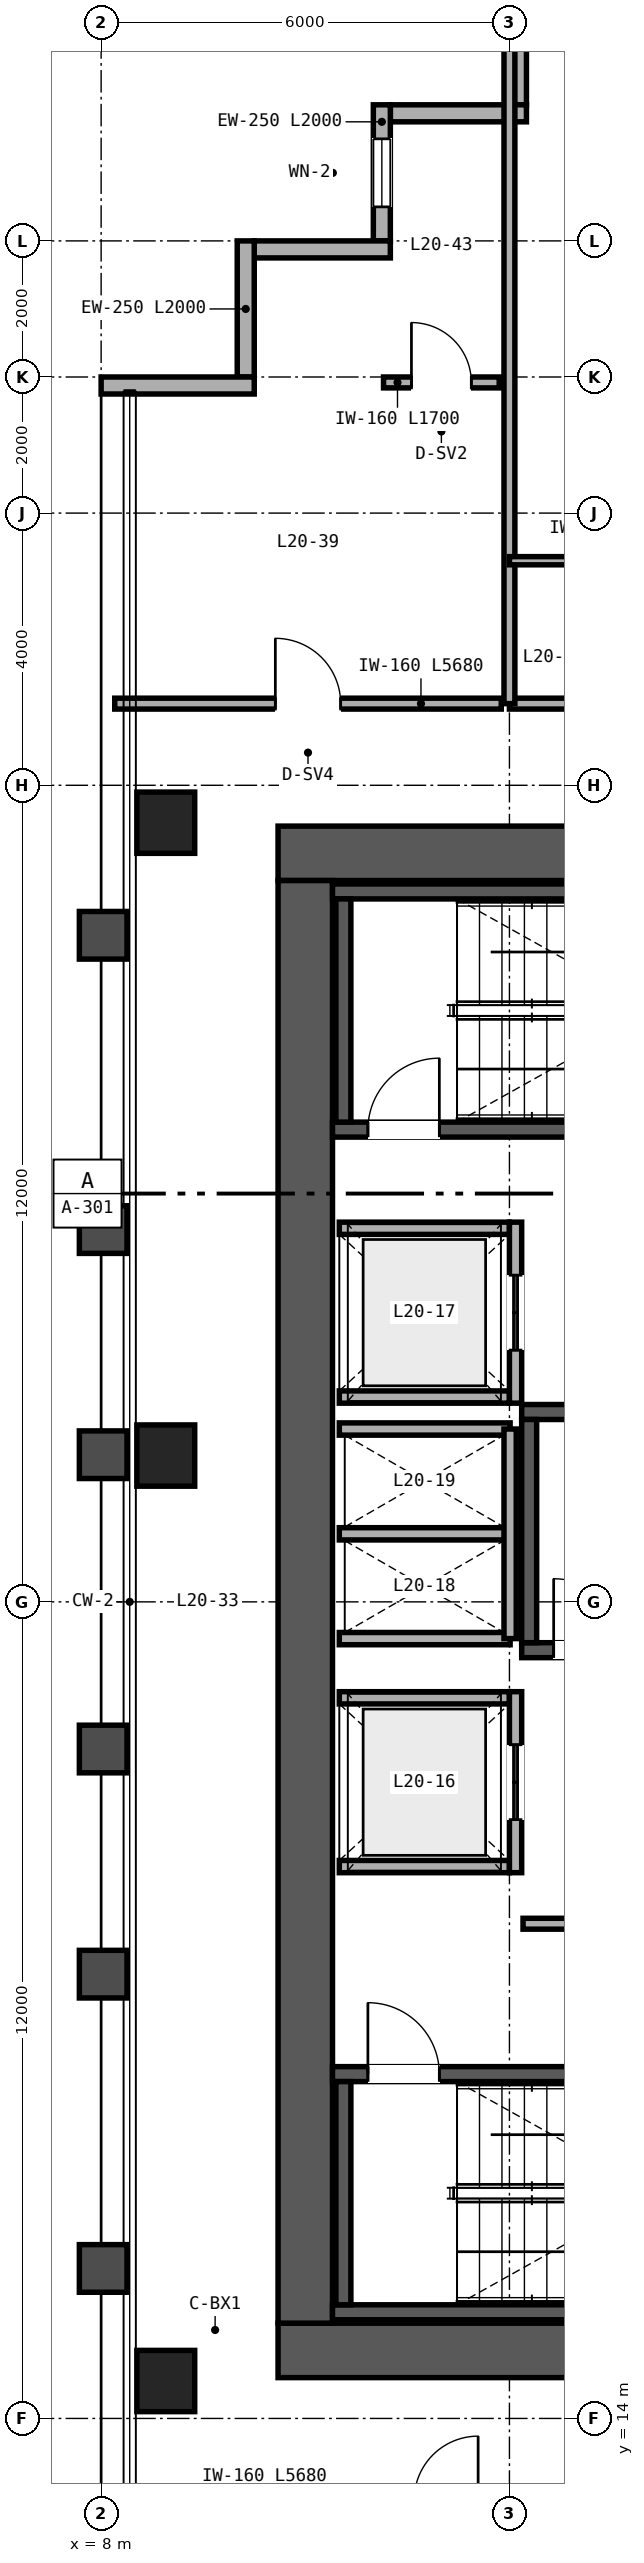
"""IFC4 building model, lengths in metres.
Left out: names, types, materials, properties, quantities, classifications, styles, units other than length and angle.
Written with IfcOpenShell. Run it as: python <this file> out.ifc"""

import sys

from ifc_helpers import new_model, si_unit, direction, frame, frame_2d, origin, origin_2d, place, context, subcontext, project, spatial, rectangle, hollow_rectangle, extrude, source, transform, mapped, element, fill, save


model = new_model("IFC4")
c1 = context("Model", 3, precision=1e-05, world=origin(), true_north=direction((0.0, 1.0)))
c2 = subcontext(c1, "Body", "Model", "MODEL_VIEW")
j1 = project(units=[si_unit("LENGTHUNIT", "METRE"), si_unit("PLANEANGLEUNIT", "RADIAN")], contexts=[c1])
p1 = place(None, origin())
s1 = spatial("IfcSite", under=j1, at=p1, CompositionType="ELEMENT")
p2 = place(p1, origin())
s2 = spatial("IfcBuilding", under=s1, at=p2, CompositionType="ELEMENT")
p3 = place(p2, frame((0.0, 0.0, 81.6)))
s3 = spatial("IfcBuildingStorey", under=s2, at=p3, CompositionType="ELEMENT", Elevation=81.6)
p4 = place(p3, frame((10.6, 15.0, 0.0), z_axis=(0.0, 0.0, 1.0), x_axis=(1.0, 0.0, 0.0)))
e1 = element("IfcWall", 1, at=p4, inside=s3, PredefinedType="SHEAR", context=c2, shape_type="SweptSolid", body=[
    extrude(rectangle(XDim=12.8, YDim=0.8, at=frame_2d((6.4, 0.0))), origin(), (0.0, 0.0, 1.0), 3.28),
])
p5 = place(p4, frame((10.3, 0.0, 0.0)))
e2 = element("IfcOpeningElement", 2, at=p5, cuts=e1, PredefinedType="OPENING", context=c2, shape_type="SweptSolid", body=[
    extrude(rectangle(XDim=1.0, YDim=2.15, at=frame_2d((0.5, 1.075))), frame((0.0, 0.41, 0.0), z_axis=(0.0, -1.0, 0.0), x_axis=(1.0, 0.0, 0.0)), (0.0, 0.0, 1.0), 0.82),
])
p6 = place(p3, frame((10.6, 37.0, 0.0), z_axis=(0.0, 0.0, 1.0), x_axis=(1.0, 0.0, 0.0)))
e3 = element("IfcWall", 3, at=p6, inside=s3, PredefinedType="SHEAR", context=c2, shape_type="SweptSolid", body=[
    extrude(rectangle(XDim=12.8, YDim=0.8, at=frame_2d((6.4, 0.0))), origin(), (0.0, 0.0, 1.0), 3.28),
])
p7 = place(p6, frame((8.98, 0.0, 0.0)))
e4 = element("IfcOpeningElement", 4, at=p7, cuts=e3, PredefinedType="OPENING", context=c2, shape_type="SweptSolid", body=[
    extrude(rectangle(XDim=1.0, YDim=2.15, at=frame_2d((0.5, 1.075))), frame((0.0, 0.41, 0.0), z_axis=(0.0, -1.0, 0.0), x_axis=(1.0, 0.0, 0.0)), (0.0, 0.0, 1.0), 0.82),
])
p8 = place(p3, frame((11.0, 15.4, 0.0), z_axis=(0.0, 0.0, 1.0), x_axis=(0.0, 1.0, 0.0)))
e5 = element("IfcWall", 5, at=p8, inside=s3, PredefinedType="SHEAR", context=c2, shape_type="SweptSolid", body=[
    extrude(rectangle(XDim=21.2, YDim=0.8, at=frame_2d((10.6, 0.0))), origin(), (0.0, 0.0, 1.0), 3.28),
])
p9 = place(p3, frame((11.4, 15.56, 0.0), z_axis=(0.0, 0.0, 1.0), x_axis=(1.0, 0.0, 0.0)))
e6 = element("IfcWall", 6, at=p9, inside=s3, PredefinedType="SHEAR", context=c2, shape_type="SweptSolid", body=[
    extrude(rectangle(XDim=7.91, YDim=0.22, at=frame_2d((3.955, 0.0))), origin(), (0.0, 0.0, 1.0), 3.4),
])
p10 = place(p3, frame((11.4, 19.06, 0.0), z_axis=(0.0, 0.0, 1.0), x_axis=(1.0, 0.0, 0.0)))
e7 = element("IfcWall", 7, at=p10, inside=s3, PredefinedType="SHEAR", context=c2, shape_type="SweptSolid", body=[
    extrude(rectangle(XDim=7.91, YDim=0.22, at=frame_2d((3.955, 0.0))), origin(), (0.0, 0.0, 1.0), 3.4),
])
p11 = place(p10, frame((0.52, 0.0, 0.0)))
e8 = element("IfcOpeningElement", 8, at=p11, cuts=e7, PredefinedType="OPENING", context=c2, shape_type="SweptSolid", body=[
    extrude(rectangle(XDim=1.05, YDim=2.15, at=frame_2d((0.525, 1.075))), frame((0.0, 0.12, 0.0), z_axis=(0.0, -1.0, 0.0), x_axis=(1.0, 0.0, 0.0)), (0.0, 0.0, 1.0), 0.24),
])
p12 = place(p3, frame((11.56, 15.67, 0.0), z_axis=(0.0, 0.0, 1.0), x_axis=(0.0, 1.0, 0.0)))
e9 = element("IfcWall", 9, at=p12, inside=s3, PredefinedType="SHEAR", context=c2, shape_type="SweptSolid", body=[
    extrude(rectangle(XDim=3.28, YDim=0.22, at=frame_2d((1.64, 0.0))), origin(), (0.0, 0.0, 1.0), 3.4),
])
p13 = place(p3, frame((11.4, 32.94, 0.0), z_axis=(0.0, 0.0, 1.0), x_axis=(1.0, 0.0, 0.0)))
e10 = element("IfcWall", 10, at=p13, inside=s3, PredefinedType="SHEAR", context=c2, shape_type="SweptSolid", body=[
    extrude(rectangle(XDim=7.91, YDim=0.22, at=frame_2d((3.955, 0.0))), origin(), (0.0, 0.0, 1.0), 3.4),
])
p14 = place(p13, frame((0.52, 0.0, 0.0)))
e11 = element("IfcOpeningElement", 11, at=p14, cuts=e10, PredefinedType="OPENING", context=c2, shape_type="SweptSolid", body=[
    extrude(rectangle(XDim=1.05, YDim=2.15, at=frame_2d((0.525, 1.075))), frame((0.0, 0.12, 0.0), z_axis=(0.0, -1.0, 0.0), x_axis=(1.0, 0.0, 0.0)), (0.0, 0.0, 1.0), 0.24),
])
p15 = place(p3, frame((11.4, 36.44, 0.0), z_axis=(0.0, 0.0, 1.0), x_axis=(1.0, 0.0, 0.0)))
e12 = element("IfcWall", 12, at=p15, inside=s3, PredefinedType="SHEAR", context=c2, shape_type="SweptSolid", body=[
    extrude(rectangle(XDim=7.91, YDim=0.22, at=frame_2d((3.955, 0.0))), origin(), (0.0, 0.0, 1.0), 3.4),
])
p16 = place(p3, frame((11.56, 33.05, 0.0), z_axis=(0.0, 0.0, 1.0), x_axis=(0.0, 1.0, 0.0)))
e13 = element("IfcWall", 13, at=p16, inside=s3, PredefinedType="SHEAR", context=c2, shape_type="SweptSolid", body=[
    extrude(rectangle(XDim=3.28, YDim=0.22, at=frame_2d((1.64, 0.0))), origin(), (0.0, 0.0, 1.0), 3.4),
])
p17 = place(p3, frame((14.18, 25.29, 0.0), z_axis=(0.0, 0.0, 1.0), x_axis=(1.0, 0.0, 0.0)))
e14 = element("IfcWall", 14, at=p17, inside=s3, PredefinedType="SHEAR", context=c2, shape_type="SweptSolid", body=[
    extrude(rectangle(XDim=8.42, YDim=0.22, at=frame_2d((4.21, 0.0))), origin(), (0.0, 0.0, 1.0), 3.4),
])
p18 = place(p17, frame((0.47, 0.0, 0.0)))
e15 = element("IfcOpeningElement", 15, at=p18, cuts=e14, PredefinedType="OPENING", context=c2, shape_type="SweptSolid", body=[
    extrude(rectangle(XDim=1.05, YDim=2.15, at=frame_2d((0.525, 1.075))), frame((0.0, 0.12, 0.0), z_axis=(0.0, -1.0, 0.0), x_axis=(1.0, 0.0, 0.0)), (0.0, 0.0, 1.0), 0.24),
])
p19 = place(p3, frame((14.18, 28.79, 0.0), z_axis=(0.0, 0.0, 1.0), x_axis=(1.0, 0.0, 0.0)))
e16 = element("IfcWall", 16, at=p19, inside=s3, PredefinedType="SHEAR", context=c2, shape_type="SweptSolid", body=[
    extrude(rectangle(XDim=8.42, YDim=0.22, at=frame_2d((4.21, 0.0))), origin(), (0.0, 0.0, 1.0), 3.4),
])
p20 = place(p3, frame((14.29, 25.4, 0.0), z_axis=(0.0, 0.0, 1.0), x_axis=(0.0, 1.0, 0.0)))
e17 = element("IfcWall", 17, at=p20, inside=s3, PredefinedType="SHEAR", context=c2, shape_type="SweptSolid", body=[
    extrude(rectangle(XDim=3.28, YDim=0.22, at=frame_2d((1.64, 0.0))), origin(), (0.0, 0.0, 1.0), 3.4),
])
m1 = source(origin(), c2, "Body", "SweptSolid", [
    extrude(hollow_rectangle(XDim=0.85, YDim=0.9, WallThickness=0.04, at=origin_2d()), origin(), (0.0, 0.0, 1.0), 3.28),
])
for number, where, z_axis, x_axis in (
    (18, (8.95, 14.55, 0.0), (0.0, 0.0, 1.0), (1.0, 0.0, 0.0)),
    (19, (8.95, 28.15, 0.0), (0.0, 0.0, 1.0), (1.0, 0.0, 0.0)),
    (20, (8.95, 37.45, 0.0), (0.0, 0.0, 1.0), (1.0, 0.0, 0.0)),
):
    element("IfcColumn", number, at=place(p3, frame(where, z_axis=z_axis, x_axis=x_axis)), inside=s3, PredefinedType="COLUMN", context=c2, shape_type="MappedRepresentation", body=[
        mapped(m1, transform((0.0, 0.0, 0.0), scale=1.0)),
    ])
p21 = place(p3, frame((14.125, 50.0, 0.0), z_axis=(0.0, 0.0, 1.0), x_axis=(0.0, -1.0, 0.0)))
e21 = element("IfcWall", 21, at=p21, inside=s3, PredefinedType="SOLIDWALL", context=c2, shape_type="SweptSolid", body=[
    extrude(rectangle(XDim=2.0, YDim=0.25, at=frame_2d((1.0, 0.0))), origin(), (0.0, 0.0, 1.0), 2.587),
])
p22 = place(p3, frame((14.25, 47.875, 0.0), z_axis=(0.0, 0.0, 1.0), x_axis=(-1.0, 0.0, 0.0)))
e22 = element("IfcWall", 22, at=p22, inside=s3, PredefinedType="SOLIDWALL", context=c2, shape_type="SweptSolid", body=[
    extrude(rectangle(XDim=2.0, YDim=0.25, at=frame_2d((1.0, 0.0))), origin(), (0.0, 0.0, 1.0), 3.28),
])
p23 = place(p3, frame((12.125, 48.0, 0.0), z_axis=(0.0, 0.0, 1.0), x_axis=(0.0, -1.0, 0.0)))
e23 = element("IfcWall", 23, at=p23, inside=s3, PredefinedType="SOLIDWALL", context=c2, shape_type="SweptSolid", body=[
    extrude(rectangle(XDim=2.0, YDim=0.25, at=frame_2d((1.0, 0.0))), origin(), (0.0, 0.0, 1.0), 3.28),
])
p24 = place(p23, frame((0.5, 0.0, 0.85)))
e24 = element("IfcOpeningElement", 24, at=p24, cuts=e23, PredefinedType="OPENING", context=c2, shape_type="SweptSolid", body=[
    extrude(rectangle(XDim=1.0, YDim=1.9, at=frame_2d((0.5, 0.95))), frame((0.0, 0.135, 0.0), z_axis=(0.0, -1.0, 0.0), x_axis=(1.0, 0.0, 0.0)), (0.0, 0.0, 1.0), 0.27),
])
for number, where, z_axis, x_axis in (
    (25, (12.25, 45.875, 0.0), (0.0, 0.0, 1.0), (-1.0, 0.0, 0.0)),
    (26, (10.125, 46.0, 0.0), (0.0, 0.0, 1.0), (0.0, -1.0, 0.0)),
):
    element("IfcWall", number, at=place(p3, frame(where, z_axis=z_axis, x_axis=x_axis)), inside=s3, PredefinedType="SOLIDWALL", context=c2, shape_type="SweptSolid", body=[
        extrude(rectangle(XDim=2.0, YDim=0.25, at=frame_2d((1.0, 0.0))), origin(), (0.0, 0.0, 1.0), 3.28),
    ])
p25 = place(p3, frame((10.25, 43.875, 0.0), z_axis=(0.0, 0.0, 1.0), x_axis=(-1.0, 0.0, 0.0)))
e27 = element("IfcWall", 27, at=p25, inside=s3, PredefinedType="SOLIDWALL", context=c2, shape_type="SweptSolid", body=[
    extrude(rectangle(XDim=2.25, YDim=0.25, at=frame_2d((1.125, 0.0))), origin(), (0.0, 0.0, 1.0), 3.28),
])
for number, where, z_axis, x_axis in (
    (28, (11.5, 22.11, 0.0), (0.0, 0.0, 1.0), (1.0, 0.0, 0.0)),
    (29, (11.5, 24.59, 0.0), (0.0, 0.0, 1.0), (1.0, 0.0, 0.0)),
):
    element("IfcWall", number, at=place(p3, frame(where, z_axis=z_axis, x_axis=x_axis)), inside=s3, PredefinedType="SOLIDWALL", context=c2, shape_type="SweptSolid", body=[
        extrude(rectangle(XDim=2.5, YDim=0.18, at=frame_2d((1.25, 0.0))), origin(), (0.0, 0.0, 1.0), 3.28),
    ])
p26 = place(p3, frame((14.09, 22.02, 0.0), z_axis=(0.0, 0.0, 1.0), x_axis=(0.0, 1.0, 0.0)))
e30 = element("IfcWall", 30, at=p26, inside=s3, PredefinedType="SOLIDWALL", context=c2, shape_type="SweptSolid", body=[
    extrude(rectangle(XDim=2.66, YDim=0.18, at=frame_2d((1.33, 0.0))), origin(), (0.0, 0.0, 1.0), 3.28),
])
p27 = place(p26, frame((0.78, 0.0, 0.0)))
e31 = element("IfcOpeningElement", 31, at=p27, cuts=e30, PredefinedType="OPENING", context=c2, shape_type="SweptSolid", body=[
    extrude(rectangle(XDim=1.1, YDim=2.2, at=frame_2d((0.55, 1.1))), frame((0.0, 0.1, 0.0), z_axis=(0.0, -1.0, 0.0), x_axis=(1.0, 0.0, 0.0)), (0.0, 0.0, 1.0), 0.2),
])
for number, where, z_axis, x_axis in (
    (32, (11.5, 29.01, 0.0), (0.0, 0.0, 1.0), (1.0, 0.0, 0.0)),
    (33, (11.5, 31.49, 0.0), (0.0, 0.0, 1.0), (1.0, 0.0, 0.0)),
):
    element("IfcWall", number, at=place(p3, frame(where, z_axis=z_axis, x_axis=x_axis)), inside=s3, PredefinedType="SOLIDWALL", context=c2, shape_type="SweptSolid", body=[
        extrude(rectangle(XDim=2.5, YDim=0.18, at=frame_2d((1.25, 0.0))), origin(), (0.0, 0.0, 1.0), 3.28),
    ])
p28 = place(p3, frame((14.09, 28.92, 0.0), z_axis=(0.0, 0.0, 1.0), x_axis=(0.0, 1.0, 0.0)))
e34 = element("IfcWall", 34, at=p28, inside=s3, PredefinedType="SOLIDWALL", context=c2, shape_type="SweptSolid", body=[
    extrude(rectangle(XDim=2.66, YDim=0.18, at=frame_2d((1.33, 0.0))), origin(), (0.0, 0.0, 1.0), 3.28),
])
p29 = place(p28, frame((0.78, 0.0, 0.0)))
e35 = element("IfcOpeningElement", 35, at=p29, cuts=e34, PredefinedType="OPENING", context=c2, shape_type="SweptSolid", body=[
    extrude(rectangle(XDim=1.1, YDim=2.2, at=frame_2d((0.55, 1.1))), frame((0.0, 0.1, 0.0), z_axis=(0.0, -1.0, 0.0), x_axis=(1.0, 0.0, 0.0)), (0.0, 0.0, 1.0), 0.2),
])
for number, where, z_axis, x_axis in (
    (36, (11.5, 25.46, 0.0), (0.0, 0.0, 1.0), (1.0, 0.0, 0.0)),
    (37, (11.5, 27.0, 0.0), (0.0, 0.0, 1.0), (1.0, 0.0, 0.0)),
    (38, (11.5, 28.54, 0.0), (0.0, 0.0, 1.0), (1.0, 0.0, 0.0)),
):
    element("IfcWall", number, at=place(p3, frame(where, z_axis=z_axis, x_axis=x_axis)), inside=s3, PredefinedType="SOLIDWALL", context=c2, shape_type="SweptSolid", body=[
        extrude(rectangle(XDim=2.51, YDim=0.18, at=frame_2d((1.255, 0.0))), origin(), (0.0, 0.0, 1.0), 3.28),
    ])
p30 = place(p3, frame((14.01, 25.46, 0.0), z_axis=(0.0, 0.0, 1.0), x_axis=(0.0, 1.0, 0.0)))
e39 = element("IfcWall", 39, at=p30, inside=s3, PredefinedType="SOLIDWALL", context=c2, shape_type="SweptSolid", body=[
    extrude(rectangle(XDim=3.08, YDim=0.18, at=frame_2d((1.54, 0.0))), origin(), (0.0, 0.0, 1.0), 3.28),
])
p31 = place(p3, frame((14.2, 21.27, 0.0), z_axis=(0.0, 0.0, 1.0), x_axis=(1.0, 0.0, 0.0)))
e40 = element("IfcWall", 40, at=p31, inside=s3, PredefinedType="PARTITIONING", context=c2, shape_type="SweptSolid", body=[
    extrude(rectangle(XDim=4.58, YDim=0.16, at=frame_2d((2.29, 0.0))), origin(), (0.0, 0.0, 1.0), 3.28),
])
p32 = place(p31, frame((1.8, 0.0, 0.0)))
e41 = element("IfcOpeningElement", 41, at=p32, cuts=e40, PredefinedType="OPENING", context=c2, shape_type="SweptSolid", body=[
    extrude(rectangle(XDim=1.0, YDim=2.15, at=frame_2d((0.5, 1.075))), frame((0.0, 0.09, 0.0), z_axis=(0.0, -1.0, 0.0), x_axis=(1.0, 0.0, 0.0)), (0.0, 0.0, 1.0), 0.18),
])
p33 = place(p3, frame((8.2, 39.2, 0.0), z_axis=(0.0, 0.0, 1.0), x_axis=(1.0, 0.0, 0.0)))
e42 = element("IfcWall", 42, at=p33, inside=s3, PredefinedType="PARTITIONING", context=c2, shape_type="SweptSolid", body=[
    extrude(rectangle(XDim=5.68, YDim=0.16, at=frame_2d((2.84, 0.0))), origin(), (0.0, 0.0, 1.0), 3.28),
])
p34 = place(p33, frame((2.36, 0.0, 0.0)))
e43 = element("IfcOpeningElement", 43, at=p34, cuts=e42, PredefinedType="OPENING", context=c2, shape_type="SweptSolid", body=[
    extrude(rectangle(XDim=0.96, YDim=2.15, at=frame_2d((0.48, 1.075))), frame((0.0, 0.09, 0.0), z_axis=(0.0, -1.0, 0.0), x_axis=(1.0, 0.0, 0.0)), (0.0, 0.0, 1.0), 0.18),
])
p35 = place(p3, frame((12.15, 43.92, 0.0), z_axis=(0.0, 0.0, 1.0), x_axis=(1.0, 0.0, 0.0)))
e44 = element("IfcWall", 44, at=p35, inside=s3, PredefinedType="PARTITIONING", context=c2, shape_type="SweptSolid", body=[
    extrude(rectangle(XDim=1.7, YDim=0.16, at=frame_2d((0.85, 0.0))), origin(), (0.0, 0.0, 1.0), 3.28),
])
p36 = place(p35, frame((0.41, 0.0, 0.0)))
e45 = element("IfcOpeningElement", 45, at=p36, cuts=e44, PredefinedType="OPENING", context=c2, shape_type="SweptSolid", body=[
    extrude(rectangle(XDim=0.88, YDim=2.15, at=frame_2d((0.44, 1.075))), frame((0.0, 0.09, 0.0), z_axis=(0.0, -1.0, 0.0), x_axis=(1.0, 0.0, 0.0)), (0.0, 0.0, 1.0), 0.18),
])
p37 = place(p3, frame((14.0, 39.2, 0.0), z_axis=(0.0, 0.0, 1.0), x_axis=(1.0, 0.0, 0.0)))
e46 = element("IfcWall", 46, at=p37, inside=s3, PredefinedType="PARTITIONING", context=c2, shape_type="SweptSolid", body=[
    extrude(rectangle(XDim=36.0, YDim=0.16, at=frame_2d((18.0, 0.0))), origin(), (0.0, 0.0, 1.0), 2.501),
])
p38 = place(p37, frame((7.7, 0.0, 0.0)))
e47 = element("IfcOpeningElement", 47, at=p38, cuts=e46, PredefinedType="OPENING", context=c2, shape_type="SweptSolid", body=[
    extrude(rectangle(XDim=0.98, YDim=2.2, at=frame_2d((0.49, 1.1))), frame((0.0, 0.09, 0.0), z_axis=(0.0, -1.0, 0.0), x_axis=(1.0, 0.0, 0.0)), (0.0, 0.0, 1.0), 0.18),
])
p39 = place(p37, frame((13.02, 0.0, 0.0)))
e48 = element("IfcOpeningElement", 48, at=p39, cuts=e46, PredefinedType="OPENING", context=c2, shape_type="SweptSolid", body=[
    extrude(rectangle(XDim=0.96, YDim=2.15, at=frame_2d((0.48, 1.075))), frame((0.0, 0.09, 0.0), z_axis=(0.0, -1.0, 0.0), x_axis=(1.0, 0.0, 0.0)), (0.0, 0.0, 1.0), 0.18),
])
p40 = place(p37, frame((24.72, 0.0, 0.0)))
e49 = element("IfcOpeningElement", 49, at=p40, cuts=e46, PredefinedType="OPENING", context=c2, shape_type="SweptSolid", body=[
    extrude(rectangle(XDim=0.98, YDim=2.2, at=frame_2d((0.49, 1.1))), frame((0.0, 0.09, 0.0), z_axis=(0.0, -1.0, 0.0), x_axis=(1.0, 0.0, 0.0)), (0.0, 0.0, 1.0), 0.18),
])
p41 = place(p37, frame((30.14, 0.0, 0.0)))
e50 = element("IfcOpeningElement", 50, at=p41, cuts=e46, PredefinedType="OPENING", context=c2, shape_type="SweptSolid", body=[
    extrude(rectangle(XDim=0.94, YDim=2.15, at=frame_2d((0.47, 1.075))), frame((0.0, 0.09, 0.0), z_axis=(0.0, -1.0, 0.0), x_axis=(1.0, 0.0, 0.0)), (0.0, 0.0, 1.0), 0.18),
])
p42 = place(p37, frame((34.74, 0.0, 0.0)))
e51 = element("IfcOpeningElement", 51, at=p42, cuts=e46, PredefinedType="OPENING", context=c2, shape_type="SweptSolid", body=[
    extrude(rectangle(XDim=0.94, YDim=2.15, at=frame_2d((0.47, 1.075))), frame((0.0, 0.09, 0.0), z_axis=(0.0, -1.0, 0.0), x_axis=(1.0, 0.0, 0.0)), (0.0, 0.0, 1.0), 0.18),
])
p43 = place(p3, frame((14.0, 39.2, 0.0), z_axis=(0.0, 0.0, 1.0), x_axis=(0.0, 1.0, 0.0)))
e52 = element("IfcWall", 52, at=p43, inside=s3, PredefinedType="PARTITIONING", context=c2, shape_type="SweptSolid", body=[
    extrude(rectangle(XDim=10.44, YDim=0.16, at=frame_2d((5.22, 0.0))), origin(), (0.0, 0.0, 1.0), 2.587),
])
p44 = place(p3, frame((14.0, 41.3, 0.0), z_axis=(0.0, 0.0, 1.0), x_axis=(1.0, 0.0, 0.0)))
e53 = element("IfcWall", 53, at=p44, inside=s3, PredefinedType="PARTITIONING", context=c2, shape_type="SweptSolid", body=[
    extrude(rectangle(XDim=2.05, YDim=0.12, at=frame_2d((1.025, 0.0))), origin(), (0.0, 0.0, 1.0), 3.28),
])
m2 = source(origin(), c2, "Body", "SweptSolid", [
    extrude(rectangle(XDim=1.0, YDim=1.9, at=frame_2d((0.5, 0.95))), frame((0.0, 0.03, 0.0), z_axis=(0.0, -1.0, 0.0), x_axis=(1.0, 0.0, 0.0)), (0.0, 0.0, 1.0), 0.06),
])
p45 = place(p24, origin())
e54 = element("IfcWindow", 54, at=p45, inside=s3, PartitioningType="SINGLE_PANEL", PredefinedType="WINDOW", context=c2, shape_type="MappedRepresentation", body=[
    mapped(m2, transform((0.0, 0.0, 0.0), scale=1.0)),
])
fill(e24, e54)
m3 = source(origin(), c2, "Body", "SweptSolid", [
    extrude(rectangle(XDim=1.05, YDim=2.15, at=frame_2d((0.525, 1.075))), frame((0.0, 0.025, 0.0), z_axis=(0.0, -1.0, 0.0), x_axis=(1.0, 0.0, 0.0)), (0.0, 0.0, 1.0), 0.05),
])
p46 = place(p11, origin())
e55 = element("IfcDoor", 55, at=p46, inside=s3, OperationType="SINGLE_SWING_LEFT", PredefinedType="DOOR", context=c2, shape_type="MappedRepresentation", body=[
    mapped(m3, transform((0.0, 0.0, 0.0), scale=1.0)),
])
fill(e8, e55)
p47 = place(p14, origin())
e56 = element("IfcDoor", 56, at=p47, inside=s3, OperationType="SINGLE_SWING_RIGHT", PredefinedType="DOOR", context=c2, shape_type="MappedRepresentation", body=[
    mapped(m3, transform((0.0, 0.0, 0.0), scale=1.0)),
])
fill(e11, e56)
p48 = place(p18, origin())
e57 = element("IfcDoor", 57, at=p48, inside=s3, OperationType="SINGLE_SWING_LEFT", PredefinedType="DOOR", context=c2, shape_type="MappedRepresentation", body=[
    mapped(m3, transform((0.0, 0.0, 0.0), scale=1.0)),
])
fill(e15, e57)
m4 = source(origin(), c2, "Body", "SweptSolid", [
    extrude(rectangle(XDim=1.1, YDim=2.2, at=frame_2d((0.55, 1.1))), frame((0.0, 0.025, 0.0), z_axis=(0.0, -1.0, 0.0), x_axis=(1.0, 0.0, 0.0)), (0.0, 0.0, 1.0), 0.05),
])
p49 = place(p27, origin())
e58 = element("IfcDoor", 58, at=p49, inside=s3, OperationType="DOUBLE_DOOR_SLIDING", PredefinedType="DOOR", context=c2, shape_type="MappedRepresentation", body=[
    mapped(m4, transform((0.0, 0.0, 0.0), scale=1.0)),
])
fill(e31, e58)
p50 = place(p29, origin())
e59 = element("IfcDoor", 59, at=p50, inside=s3, OperationType="DOUBLE_DOOR_SLIDING", PredefinedType="DOOR", context=c2, shape_type="MappedRepresentation", body=[
    mapped(m4, transform((0.0, 0.0, 0.0), scale=1.0)),
])
fill(e35, e59)
m5 = source(origin(), c2, "Body", "SweptSolid", [
    extrude(rectangle(XDim=0.96, YDim=2.15, at=frame_2d((0.48, 1.075))), frame((0.0, 0.025, 0.0), z_axis=(0.0, -1.0, 0.0), x_axis=(1.0, 0.0, 0.0)), (0.0, 0.0, 1.0), 0.05),
])
p51 = place(p34, origin())
e60 = element("IfcDoor", 60, at=p51, inside=s3, OperationType="SINGLE_SWING_LEFT", PredefinedType="DOOR", context=c2, shape_type="MappedRepresentation", body=[
    mapped(m5, transform((0.0, 0.0, 0.0), scale=1.0)),
])
fill(e43, e60)
m6 = source(origin(), c2, "Body", "SweptSolid", [
    extrude(rectangle(XDim=0.88, YDim=2.15, at=frame_2d((0.44, 1.075))), frame((0.0, 0.025, 0.0), z_axis=(0.0, -1.0, 0.0), x_axis=(1.0, 0.0, 0.0)), (0.0, 0.0, 1.0), 0.05),
])
p52 = place(p36, origin())
e61 = element("IfcDoor", 61, at=p52, inside=s3, OperationType="SINGLE_SWING_LEFT", PredefinedType="DOOR", context=c2, shape_type="MappedRepresentation", body=[
    mapped(m6, transform((0.0, 0.0, 0.0), scale=1.0)),
])
fill(e45, e61)
save(model, sys.argv[1])
